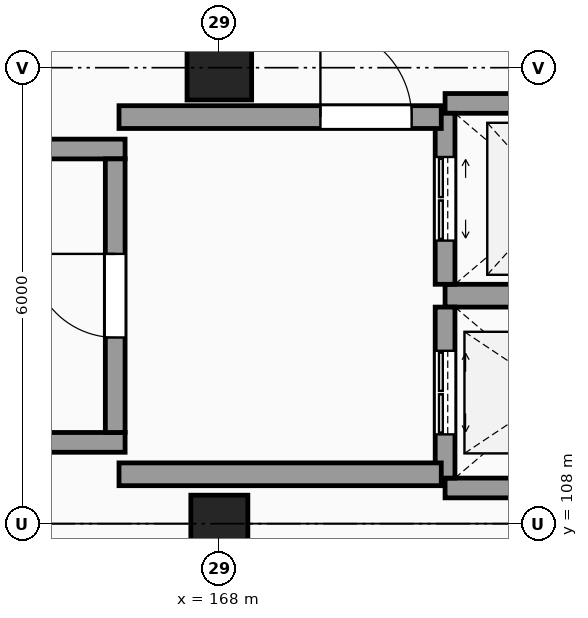
"""IFC4 building model, lengths in metres.
Left out: names, types, materials, properties, quantities, classifications, styles, units other than length and angle.
Written with IfcOpenShell. Run it as: python <this file> out.ifc"""

import sys

from ifc_helpers import new_model, si_unit, direction, frame, frame_2d, origin, origin_2d, place, context, subcontext, project, spatial, rectangle, circle, extrude, element, fill, save


model = new_model("IFC4")
c1 = context("Model", 3, precision=1e-05, world=origin(), true_north=direction((0.0, 1.0)))
c2 = subcontext(c1, "Body", "Model", "MODEL_VIEW")
j1 = project(units=[si_unit("LENGTHUNIT", "METRE"), si_unit("PLANEANGLEUNIT", "RADIAN")], contexts=[c1])
p1 = place(None, origin())
s1 = spatial("IfcSite", under=j1, at=p1, CompositionType="ELEMENT")
p2 = place(p1, origin())
s2 = spatial("IfcBuilding", under=s1, at=p2, CompositionType="ELEMENT")
p3 = place(p2, frame((0.0, 0.0, 6.0)))
s3 = spatial("IfcBuildingStorey", under=s2, at=p3, CompositionType="ELEMENT", Elevation=6.0)
p4 = place(p3, frame((168.0, 108.0, 0.0), z_axis=(0.0, 0.0, 1.0), x_axis=(1.0, 0.0, 0.0)))
e1 = element("IfcColumn", 1, at=p4, inside=s3, PredefinedType="COLUMN", context=c2, shape_type="SweptSolid", body=[
    extrude(rectangle(XDim=0.75, YDim=0.75, at=origin_2d()), origin(), (0.0, 0.0, 1.0), 4.5),
])
p5 = place(p3, frame((168.0, 114.0, 0.0), z_axis=(0.0, 0.0, 1.0), x_axis=(1.0, 0.0, 0.0)))
e2 = element("IfcColumn", 2, at=p5, inside=s3, PredefinedType="COLUMN", context=c2, shape_type="SweptSolid", body=[
    extrude(circle(Radius=0.425, at=origin_2d()), origin(), (0.0, 0.0, 1.0), 4.5),
])
for number, where, z_axis, x_axis in (
    (3, (156.04, 109.07, 0.0), (0.0, 0.0, 1.0), (1.0, 0.0, 0.0)),
    (4, (156.04, 112.93, 0.0), (0.0, 0.0, 1.0), (1.0, 0.0, 0.0)),
):
    element("IfcWall", number, at=place(p3, frame(where, z_axis=z_axis, x_axis=x_axis)), inside=s3, PredefinedType="SHEAR", context=c2, shape_type="SweptSolid", body=[
        extrude(rectangle(XDim=10.72, YDim=0.26, at=frame_2d((5.36, 0.0))), origin(), (0.0, 0.0, 1.0), 4.5),
    ])
p6 = place(p3, frame((166.63, 109.2, 0.0), z_axis=(0.0, 0.0, 1.0), x_axis=(0.0, 1.0, 0.0)))
e5 = element("IfcWall", 5, at=p6, inside=s3, PredefinedType="SHEAR", context=c2, shape_type="SweptSolid", body=[
    extrude(rectangle(XDim=3.6, YDim=0.26, at=frame_2d((1.8, 0.0))), origin(), (0.0, 0.0, 1.0), 4.5),
])
p7 = place(p6, frame((1.25, 0.0, 0.0)))
e6 = element("IfcOpeningElement", 6, at=p7, cuts=e5, PredefinedType="OPENING", context=c2, shape_type="SweptSolid", body=[
    extrude(rectangle(XDim=1.1, YDim=2.15, at=frame_2d((0.55, 1.075))), frame((0.0, 0.14, 0.0), z_axis=(0.0, -1.0, 0.0), x_axis=(1.0, 0.0, 0.0)), (0.0, 0.0, 1.0), 0.28),
])
p8 = place(p3, frame((170.97, 108.47, 0.0), z_axis=(0.0, 0.0, 1.0), x_axis=(1.0, 0.0, 0.0)))
e7 = element("IfcWall", 7, at=p8, inside=s3, PredefinedType="SHEAR", context=c2, shape_type="SweptSolid", body=[
    extrude(rectangle(XDim=2.91, YDim=0.26, at=frame_2d((1.455, 0.0))), origin(), (0.0, 0.0, 1.0), 4.5),
])
p9 = place(p3, frame((170.97, 111.0, 0.0), z_axis=(0.0, 0.0, 1.0), x_axis=(1.0, 0.0, 0.0)))
e8 = element("IfcWall", 8, at=p9, inside=s3, PredefinedType="SHEAR", context=c2, shape_type="SweptSolid", body=[
    extrude(rectangle(XDim=2.91, YDim=0.3, at=frame_2d((1.455, 0.0))), origin(), (0.0, 0.0, 1.0), 4.5),
])
p10 = place(p3, frame((170.97, 108.6, 0.0), z_axis=(0.0, 0.0, 1.0), x_axis=(0.0, 1.0, 0.0)))
e9 = element("IfcWall", 9, at=p10, inside=s3, PredefinedType="SHEAR", context=c2, shape_type="SweptSolid", body=[
    extrude(rectangle(XDim=2.25, YDim=0.26, at=frame_2d((1.125, 0.0))), origin(), (0.0, 0.0, 1.0), 4.5),
])
p11 = place(p10, frame((0.575, 0.0, 0.0)))
e10 = element("IfcOpeningElement", 10, at=p11, cuts=e9, PredefinedType="OPENING", context=c2, shape_type="SweptSolid", body=[
    extrude(rectangle(XDim=1.1, YDim=2.2, at=frame_2d((0.55, 1.1))), frame((0.0, 0.14, 0.0), z_axis=(0.0, -1.0, 0.0), x_axis=(1.0, 0.0, 0.0)), (0.0, 0.0, 1.0), 0.28),
])
p12 = place(p3, frame((170.97, 113.53, 0.0), z_axis=(0.0, 0.0, 1.0), x_axis=(1.0, 0.0, 0.0)))
e11 = element("IfcWall", 11, at=p12, inside=s3, PredefinedType="SHEAR", context=c2, shape_type="SweptSolid", body=[
    extrude(rectangle(XDim=2.91, YDim=0.26, at=frame_2d((1.455, 0.0))), origin(), (0.0, 0.0, 1.0), 4.5),
])
p13 = place(p3, frame((170.97, 111.15, 0.0), z_axis=(0.0, 0.0, 1.0), x_axis=(0.0, 1.0, 0.0)))
e12 = element("IfcWall", 12, at=p13, inside=s3, PredefinedType="SHEAR", context=c2, shape_type="SweptSolid", body=[
    extrude(rectangle(XDim=2.25, YDim=0.26, at=frame_2d((1.125, 0.0))), origin(), (0.0, 0.0, 1.0), 4.5),
])
p14 = place(p13, frame((0.575, 0.0, 0.0)))
e13 = element("IfcOpeningElement", 13, at=p14, cuts=e12, PredefinedType="OPENING", context=c2, shape_type="SweptSolid", body=[
    extrude(rectangle(XDim=1.1, YDim=2.2, at=frame_2d((0.55, 1.1))), frame((0.0, 0.14, 0.0), z_axis=(0.0, -1.0, 0.0), x_axis=(1.0, 0.0, 0.0)), (0.0, 0.0, 1.0), 0.28),
])
p15 = place(p3, frame((166.68, 113.35, 0.0), z_axis=(0.0, 0.0, 1.0), x_axis=(1.0, 0.0, 0.0)))
e14 = element("IfcWall", 14, at=p15, inside=s3, PredefinedType="SHEAR", context=c2, shape_type="SweptSolid", body=[
    extrude(rectangle(XDim=4.24, YDim=0.3, at=frame_2d((2.12, 0.0))), origin(), (0.0, 0.0, 1.0), 4.5),
])
p16 = place(p15, frame((2.65, 0.0, 0.0)))
e15 = element("IfcOpeningElement", 15, at=p16, cuts=e14, PredefinedType="OPENING", context=c2, shape_type="SweptSolid", body=[
    extrude(rectangle(XDim=1.2, YDim=2.2, at=frame_2d((0.6, 1.1))), frame((0.0, 0.16, 0.0), z_axis=(0.0, -1.0, 0.0), x_axis=(1.0, 0.0, 0.0)), (0.0, 0.0, 1.0), 0.32),
])
p17 = place(p3, frame((166.68, 108.65, 0.0), z_axis=(0.0, 0.0, 1.0), x_axis=(1.0, 0.0, 0.0)))
e16 = element("IfcWall", 16, at=p17, inside=s3, PredefinedType="SHEAR", context=c2, shape_type="SweptSolid", body=[
    extrude(rectangle(XDim=4.24, YDim=0.3, at=frame_2d((2.12, 0.0))), origin(), (0.0, 0.0, 1.0), 4.5),
])
p18 = place(p7, origin())
e17 = element("IfcDoor", 17, at=p18, inside=s3, OperationType="SINGLE_SWING_RIGHT", PredefinedType="DOOR", context=c2, shape_type="SweptSolid", body=[
    extrude(rectangle(XDim=1.1, YDim=2.15, at=frame_2d((0.55, 1.075))), frame((0.0, 0.025, 0.0), z_axis=(0.0, -1.0, 0.0), x_axis=(1.0, 0.0, 0.0)), (0.0, 0.0, 1.0), 0.05),
])
fill(e6, e17)
p19 = place(p11, origin())
e18 = element("IfcDoor", 18, at=p19, inside=s3, OperationType="DOUBLE_DOOR_SLIDING", PredefinedType="DOOR", context=c2, shape_type="SweptSolid", body=[
    extrude(rectangle(XDim=1.1, YDim=2.2, at=frame_2d((0.55, 1.1))), frame((0.0, 0.025, 0.0), z_axis=(0.0, -1.0, 0.0), x_axis=(1.0, 0.0, 0.0)), (0.0, 0.0, 1.0), 0.05),
])
fill(e10, e18)
p20 = place(p14, origin())
e19 = element("IfcDoor", 19, at=p20, inside=s3, OperationType="DOUBLE_DOOR_SLIDING", PredefinedType="DOOR", context=c2, shape_type="SweptSolid", body=[
    extrude(rectangle(XDim=1.1, YDim=2.2, at=frame_2d((0.55, 1.1))), frame((0.0, 0.025, 0.0), z_axis=(0.0, -1.0, 0.0), x_axis=(1.0, 0.0, 0.0)), (0.0, 0.0, 1.0), 0.05),
])
fill(e13, e19)
p21 = place(p16, origin())
e20 = element("IfcDoor", 20, at=p21, inside=s3, OperationType="SINGLE_SWING_LEFT", PredefinedType="DOOR", context=c2, shape_type="SweptSolid", body=[
    extrude(rectangle(XDim=1.2, YDim=2.2, at=frame_2d((0.6, 1.1))), frame((0.0, 0.025, 0.0), z_axis=(0.0, -1.0, 0.0), x_axis=(1.0, 0.0, 0.0)), (0.0, 0.0, 1.0), 0.05),
])
fill(e15, e20)
save(model, sys.argv[1])
